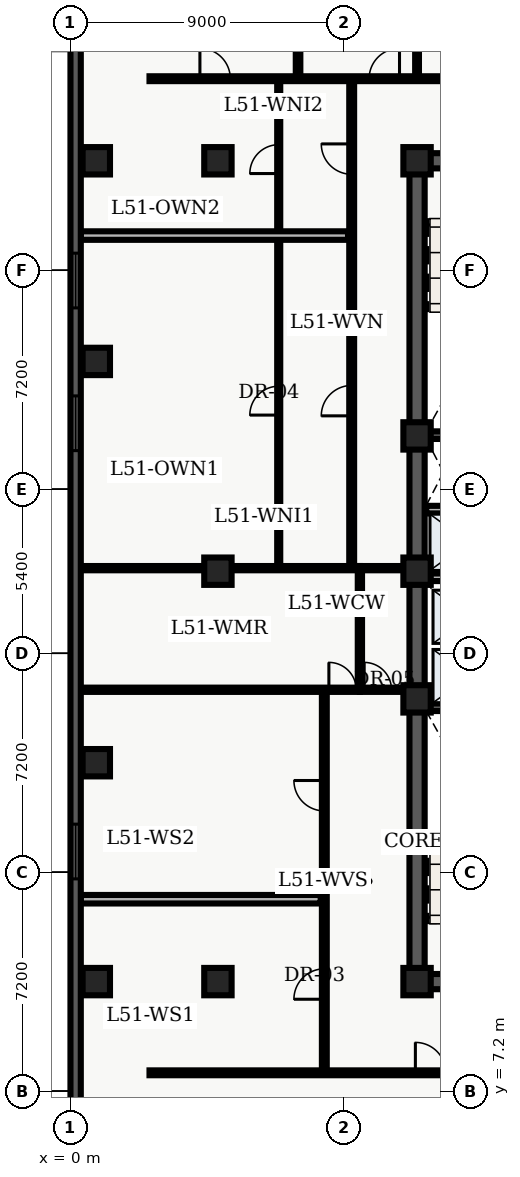
"""IFC4 building model, lengths in metres.
Left out: names, types, materials, properties, quantities, classifications, styles, units other than length and angle.
Written with IfcOpenShell. Run it as: python <this file> out.ifc"""

import sys

from ifc_helpers import new_model, entity, si_unit, converted_unit, direction, frame, origin_with_axes, origin_2d_with_axis, place, context, subcontext, project, spatial, polyline, rectangle, outline, extrude, element, fill, save


model = new_model("IFC4")
c1 = context("Model", 3, precision=1e-05, world=origin_with_axes(), true_north=direction((0.0, 1.0)))
c2 = subcontext(c1, "Body", "Model", "MODEL_VIEW")
j1 = project(units=[si_unit("LENGTHUNIT", "METRE"), converted_unit("PLANEANGLEUNIT", "DEGREE", entity("IfcPlaneAngleMeasure", 0.017), si_unit("PLANEANGLEUNIT", "RADIAN"), dimensions=[0, 0, 0, 0, 0, 0, 0])], contexts=[c1])
p1 = place(None, origin_with_axes())
s1 = spatial("IfcSite", under=j1, at=p1, CompositionType="ELEMENT")
p2 = place(p1, origin_with_axes())
s2 = spatial("IfcBuilding", under=s1, at=p2, CompositionType="ELEMENT")
p3 = place(p2, frame((0.0, 0.0, 208.2), z_axis=(0.0, 0.0, 1.0), x_axis=(1.0, 0.0, 0.0)))
s3 = spatial("IfcBuildingStorey", under=s2, at=p3, CompositionType="ELEMENT", Elevation=208.2)
p4 = place(p3, frame((11.4, 10.8, 0.0), z_axis=(0.0, 0.0, 1.0), x_axis=(0.0, 1.0, 0.0)))
e1 = element("IfcWall", 1, at=p4, inside=s3, PredefinedType="SHEAR", context=c2, shape_type="SweptSolid", body=[
    extrude(outline(polyline([(0.0, -0.25), (27.0, -0.25), (27.0, 0.25), (0.0, 0.25), (0.0, -0.25)])), origin_with_axes(), (0.0, 0.0, 1.0), 3.66),
])
p5 = place(p3, frame((11.4, 10.8, 0.0), z_axis=(0.0, 0.0, 1.0), x_axis=(1.0, 0.0, 0.0)))
e2 = element("IfcWall", 2, at=p5, inside=s3, PredefinedType="SHEAR", context=c2, shape_type="SweptSolid", body=[
    extrude(outline(polyline([(0.0, -0.25), (7.2, -0.25), (7.2, 0.25), (0.0, 0.25), (0.0, -0.25)])), origin_with_axes(), (0.0, 0.0, 1.0), 3.66),
])
p6 = place(p5, frame((2.625, 0.0, 0.0), z_axis=(0.0, 0.0, 1.0), x_axis=(1.0, 0.0, 0.0)))
e3 = element("IfcOpeningElement", 3, at=p6, cuts=e2, PredefinedType="OPENING", context=c2, shape_type="SweptSolid", body=[
    extrude(rectangle(XDim=1.05, YDim=0.52, at=origin_2d_with_axis()), origin_with_axes(), (0.0, 0.0, 1.0), 2.15),
])
p7 = place(p3, frame((11.4, 37.8, 0.0), z_axis=(0.0, 0.0, 1.0), x_axis=(1.0, 0.0, 0.0)))
e4 = element("IfcWall", 4, at=p7, inside=s3, PredefinedType="SHEAR", context=c2, shape_type="SweptSolid", body=[
    extrude(outline(polyline([(0.0, -0.25), (7.2, -0.25), (7.2, 0.25), (0.0, 0.25), (0.0, -0.25)])), origin_with_axes(), (0.0, 0.0, 1.0), 3.66),
])
p8 = place(p7, frame((2.625, 0.0, 0.0), z_axis=(0.0, 0.0, 1.0), x_axis=(1.0, 0.0, 0.0)))
e5 = element("IfcOpeningElement", 5, at=p8, cuts=e4, PredefinedType="OPENING", context=c2, shape_type="SweptSolid", body=[
    extrude(rectangle(XDim=1.05, YDim=0.52, at=origin_2d_with_axis()), origin_with_axes(), (0.0, 0.0, 1.0), 2.15),
])
for number, where, z_axis, x_axis in (
    (6, (11.65, 19.825, 0.0), (0.0, 0.0, 1.0), (1.0, 0.0, 0.0)),
    (7, (11.65, 28.775, 0.0), (0.0, 0.0, 1.0), (1.0, 0.0, 0.0)),
):
    element("IfcWall", number, at=place(p3, frame(where, z_axis=z_axis, x_axis=x_axis)), inside=s3, PredefinedType="SHEAR", context=c2, shape_type="SweptSolid", body=[
        extrude(outline(polyline([(0.0, -0.125), (6.7, -0.125), (6.7, 0.125), (0.0, 0.125), (0.0, -0.125)])), origin_with_axes(), (0.0, 0.0, 1.0), 3.66),
    ])
p9 = place(p3, frame((11.7, 24.1, 0.0), z_axis=(0.0, 0.0, 1.0), x_axis=(1.0, 0.0, 0.0)))
e8 = element("IfcWall", 8, at=p9, inside=s3, PredefinedType="SOLIDWALL", context=c2, shape_type="SweptSolid", body=[
    extrude(outline(polyline([(0.0, -0.125), (6.6, -0.125), (6.6, 0.125), (0.0, 0.125), (0.0, -0.125)])), origin_with_axes(), (0.0, 0.0, 1.0), 2.7),
])
p10 = place(p9, frame((3.6, 0.0, 0.0), z_axis=(0.0, 0.0, 1.0), x_axis=(1.0, 0.0, 0.0)))
e9 = element("IfcOpeningElement", 9, at=p10, cuts=e8, PredefinedType="OPENING", context=c2, shape_type="SweptSolid", body=[
    extrude(rectangle(XDim=0.9, YDim=0.27, at=origin_2d_with_axis()), origin_with_axes(), (0.0, 0.0, 1.0), 2.15),
])
p11 = place(p9, frame((5.65, 0.0, 0.0), z_axis=(0.0, 0.0, 1.0), x_axis=(1.0, 0.0, 0.0)))
e10 = element("IfcOpeningElement", 10, at=p11, cuts=e8, PredefinedType="OPENING", context=c2, shape_type="SweptSolid", body=[
    extrude(rectangle(XDim=0.9, YDim=0.27, at=origin_2d_with_axis()), origin_with_axes(), (0.0, 0.0, 1.0), 2.15),
])
p12 = place(p3, frame((11.7, 26.325, 0.0), z_axis=(0.0, 0.0, 1.0), x_axis=(1.0, 0.0, 0.0)))
e11 = element("IfcWall", 11, at=p12, inside=s3, PredefinedType="SOLIDWALL", context=c2, shape_type="SweptSolid", body=[
    extrude(outline(polyline([(0.0, -0.125), (6.6, -0.125), (6.6, 0.125), (0.0, 0.125), (0.0, -0.125)])), origin_with_axes(), (0.0, 0.0, 1.0), 2.7),
])
p13 = place(p12, frame((3.5, 0.0, 0.0), z_axis=(0.0, 0.0, 1.0), x_axis=(1.0, 0.0, 0.0)))
e12 = element("IfcOpeningElement", 12, at=p13, cuts=e11, PredefinedType="OPENING", context=c2, shape_type="SweptSolid", body=[
    extrude(rectangle(XDim=0.9, YDim=0.27, at=origin_2d_with_axis()), origin_with_axes(), (0.0, 0.0, 1.0), 2.15),
])
for number, where, z_axis, x_axis in (
    (13, (11.4, 10.8, 0.0), (0.0, 0.0, 1.0), (1.0, 0.0, 0.0)),
    (14, (11.4, 20.1, 0.0), (0.0, 0.0, 1.0), (1.0, 0.0, 0.0)),
    (15, (11.4, 24.3, 0.0), (0.0, 0.0, 1.0), (1.0, 0.0, 0.0)),
    (16, (11.4, 28.75, 0.0), (0.0, 0.0, 1.0), (1.0, 0.0, 0.0)),
    (17, (11.4, 37.8, 0.0), (0.0, 0.0, 1.0), (1.0, 0.0, 0.0)),
    (18, (4.85, 10.8, 0.0), (0.0, 0.0, 1.0), (1.0, 0.0, 0.0)),
    (19, (4.85, 24.3, 0.0), (0.0, 0.0, 1.0), (1.0, 0.0, 0.0)),
    (20, (4.85, 37.8, 0.0), (0.0, 0.0, 1.0), (1.0, 0.0, 0.0)),
    (21, (0.85, 10.8, 0.0), (0.0, 0.0, 1.0), (1.0, 0.0, 0.0)),
    (22, (0.85, 18.0, 0.0), (0.0, 0.0, 1.0), (1.0, 0.0, 0.0)),
    (23, (0.85, 31.2, 0.0), (0.0, 0.0, 1.0), (1.0, 0.0, 0.0)),
    (24, (0.85, 37.8, 0.0), (0.0, 0.0, 1.0), (1.0, 0.0, 0.0)),
):
    element("IfcColumn", number, at=place(p3, frame(where, z_axis=z_axis, x_axis=x_axis)), inside=s3, PredefinedType="COLUMN", context=c2, shape_type="SweptSolid", body=[
        extrude(rectangle(XDim=0.9, YDim=0.9, at=origin_2d_with_axis()), origin_with_axes(), (0.0, 0.0, 1.0), 3.9),
    ])
p14 = place(p3, frame((9.52, 20.4, 0.0), z_axis=(0.0, 0.0, 1.0), x_axis=(0.0, 1.0, 0.0)))
e25 = element("IfcWall", 25, at=p14, inside=s3, PredefinedType="PARTITIONING", context=c2, shape_type="SweptSolid", body=[
    extrude(outline(polyline([(0.0, -0.07), (4.0, -0.07), (4.0, 0.07), (0.0, 0.07), (0.0, -0.07)])), origin_with_axes(), (0.0, 0.0, 1.0), 2.7),
])
p15 = place(p3, frame((9.52, 20.4, 0.0), z_axis=(0.0, 0.0, 1.0), x_axis=(1.0, 0.0, 0.0)))
e26 = element("IfcWall", 26, at=p15, inside=s3, PredefinedType="PARTITIONING", context=c2, shape_type="SweptSolid", body=[
    extrude(outline(polyline([(0.0, -0.07), (1.58, -0.07), (1.58, 0.07), (0.0, 0.07), (0.0, -0.07)])), origin_with_axes(), (0.0, 0.0, 1.0), 2.7),
])
p16 = place(p15, frame((0.59, 0.0, 0.0), z_axis=(0.0, 0.0, 1.0), x_axis=(1.0, 0.0, 0.0)))
e27 = element("IfcOpeningElement", 27, at=p16, cuts=e26, PredefinedType="OPENING", context=c2, shape_type="SweptSolid", body=[
    extrude(rectangle(XDim=0.9, YDim=0.16, at=origin_2d_with_axis()), origin_with_axes(), (0.0, 0.0, 1.0), 2.15),
])
p17 = place(p3, frame((9.52, 24.4, 0.0), z_axis=(0.0, 0.0, 1.0), x_axis=(1.0, 0.0, 0.0)))
e28 = element("IfcWall", 28, at=p17, inside=s3, PredefinedType="PARTITIONING", context=c2, shape_type="SweptSolid", body=[
    extrude(outline(polyline([(0.0, -0.07), (1.58, -0.07), (1.58, 0.07), (0.0, 0.07), (0.0, -0.07)])), origin_with_axes(), (0.0, 0.0, 1.0), 2.7),
])
p18 = place(p3, frame((2.6, 7.8, 0.0), z_axis=(0.0, 0.0, 1.0), x_axis=(1.0, 0.0, 0.0)))
e29 = element("IfcWall", 29, at=p18, inside=s3, PredefinedType="PARTITIONING", context=c2, shape_type="SweptSolid", body=[
    extrude(outline(polyline([(0.0, -0.08), (18.55, -0.08), (18.55, 0.08), (0.0, 0.08), (0.0, -0.08)])), origin_with_axes(), (0.0, 0.0, 1.0), 2.7),
])
p19 = place(p18, frame((9.245, 0.0, 0.0), z_axis=(0.0, 0.0, 1.0), x_axis=(1.0, 0.0, 0.0)))
e30 = element("IfcOpeningElement", 30, at=p19, cuts=e29, PredefinedType="OPENING", context=c2, shape_type="SweptSolid", body=[
    extrude(rectangle(XDim=1.0, YDim=0.18, at=origin_2d_with_axis()), origin_with_axes(), (0.0, 0.0, 1.0), 2.15),
])
p20 = place(p3, frame((2.6, 40.5, 0.0), z_axis=(0.0, 0.0, 1.0), x_axis=(1.0, 0.0, 0.0)))
e31 = element("IfcWall", 31, at=p20, inside=s3, PredefinedType="PARTITIONING", context=c2, shape_type="SweptSolid", body=[
    extrude(outline(polyline([(0.0, -0.08), (27.751, -0.08), (27.751, 0.08), (0.0, 0.08), (0.0, -0.08)])), origin_with_axes(), (0.0, 0.0, 1.0), 2.7),
])
p21 = place(p20, frame((2.158, 0.0, 0.0), z_axis=(0.0, 0.0, 1.0), x_axis=(1.0, 0.0, 0.0)))
e32 = element("IfcOpeningElement", 32, at=p21, cuts=e31, PredefinedType="OPENING", context=c2, shape_type="SweptSolid", body=[
    extrude(rectangle(XDim=1.0, YDim=0.18, at=origin_2d_with_axis()), origin_with_axes(), (0.0, 0.0, 1.0), 2.15),
])
p22 = place(p20, frame((7.723, 0.0, 0.0), z_axis=(0.0, 0.0, 1.0), x_axis=(1.0, 0.0, 0.0)))
e33 = element("IfcOpeningElement", 33, at=p22, cuts=e31, PredefinedType="OPENING", context=c2, shape_type="SweptSolid", body=[
    extrude(rectangle(XDim=1.0, YDim=0.18, at=origin_2d_with_axis()), origin_with_axes(), (0.0, 0.0, 1.0), 2.15),
])
p23 = place(p20, frame((11.266, 0.0, 0.0), z_axis=(0.0, 0.0, 1.0), x_axis=(1.0, 0.0, 0.0)))
e34 = element("IfcOpeningElement", 34, at=p23, cuts=e31, PredefinedType="OPENING", context=c2, shape_type="SweptSolid", body=[
    extrude(rectangle(XDim=1.0, YDim=0.18, at=origin_2d_with_axis()), origin_with_axes(), (0.0, 0.0, 1.0), 2.15),
])
p24 = place(p20, frame((15.626, 0.0, 0.0), z_axis=(0.0, 0.0, 1.0), x_axis=(1.0, 0.0, 0.0)))
e35 = element("IfcOpeningElement", 35, at=p24, cuts=e31, PredefinedType="OPENING", context=c2, shape_type="SweptSolid", body=[
    extrude(rectangle(XDim=1.0, YDim=0.18, at=origin_2d_with_axis()), origin_with_axes(), (0.0, 0.0, 1.0), 2.15),
])
p25 = place(p3, frame((8.35, 7.8, 0.0), z_axis=(0.0, 0.0, 1.0), x_axis=(0.0, 1.0, 0.0)))
e36 = element("IfcWall", 36, at=p25, inside=s3, PredefinedType="PARTITIONING", context=c2, shape_type="SweptSolid", body=[
    extrude(outline(polyline([(0.0, -0.08), (12.6, -0.08), (12.6, 0.08), (0.0, 0.08), (0.0, -0.08)])), origin_with_axes(), (0.0, 0.0, 1.0), 2.7),
])
p26 = place(p25, frame((2.92, 0.0, 0.0), z_axis=(0.0, 0.0, 1.0), x_axis=(1.0, 0.0, 0.0)))
e37 = element("IfcOpeningElement", 37, at=p26, cuts=e36, PredefinedType="OPENING", context=c2, shape_type="SweptSolid", body=[
    extrude(rectangle(XDim=1.0, YDim=0.18, at=origin_2d_with_axis()), origin_with_axes(), (0.0, 0.0, 1.0), 2.15),
])
p27 = place(p25, frame((9.115, 0.0, 0.0), z_axis=(0.0, 0.0, 1.0), x_axis=(1.0, 0.0, 0.0)))
e38 = element("IfcOpeningElement", 38, at=p27, cuts=e36, PredefinedType="OPENING", context=c2, shape_type="SweptSolid", body=[
    extrude(rectangle(XDim=1.0, YDim=0.18, at=origin_2d_with_axis()), origin_with_axes(), (0.0, 0.0, 1.0), 2.15),
])
p28 = place(p3, frame((9.25, 24.4, 0.0), z_axis=(0.0, 0.0, 1.0), x_axis=(0.0, 1.0, 0.0)))
e39 = element("IfcWall", 39, at=p28, inside=s3, PredefinedType="PARTITIONING", context=c2, shape_type="SweptSolid", body=[
    extrude(outline(polyline([(0.0, -0.08), (16.1, -0.08), (16.1, 0.08), (0.0, 0.08), (0.0, -0.08)])), origin_with_axes(), (0.0, 0.0, 1.0), 2.7),
])
p29 = place(p28, frame((5.51, 0.0, 0.0), z_axis=(0.0, 0.0, 1.0), x_axis=(1.0, 0.0, 0.0)))
e40 = element("IfcOpeningElement", 40, at=p29, cuts=e39, PredefinedType="OPENING", context=c2, shape_type="SweptSolid", body=[
    extrude(rectangle(XDim=1.0, YDim=0.18, at=origin_2d_with_axis()), origin_with_axes(), (0.0, 0.0, 1.0), 2.15),
])
p30 = place(p28, frame((13.455, 0.0, 0.0), z_axis=(0.0, 0.0, 1.0), x_axis=(1.0, 0.0, 0.0)))
e41 = element("IfcOpeningElement", 41, at=p30, cuts=e39, PredefinedType="OPENING", context=c2, shape_type="SweptSolid", body=[
    extrude(rectangle(XDim=1.0, YDim=0.18, at=origin_2d_with_axis()), origin_with_axes(), (0.0, 0.0, 1.0), 2.15),
])
p31 = place(p3, frame((0.335, 20.4, 0.0), z_axis=(0.0, 0.0, 1.0), x_axis=(1.0, 0.0, 0.0)))
e42 = element("IfcWall", 42, at=p31, inside=s3, PredefinedType="PARTITIONING", context=c2, shape_type="SweptSolid", body=[
    extrude(outline(polyline([(0.0, -0.07), (9.185, -0.07), (9.185, 0.07), (0.0, 0.07), (0.0, -0.07)])), origin_with_axes(), (0.0, 0.0, 1.0), 2.7),
])
p32 = place(p31, frame((8.615, 0.0, 0.0), z_axis=(0.0, 0.0, 1.0), x_axis=(1.0, 0.0, 0.0)))
e43 = element("IfcOpeningElement", 43, at=p32, cuts=e42, PredefinedType="OPENING", context=c2, shape_type="SweptSolid", body=[
    extrude(rectangle(XDim=0.9, YDim=0.16, at=origin_2d_with_axis()), origin_with_axes(), (0.0, 0.0, 1.0), 2.15),
])
p33 = place(p3, frame((0.335, 24.4, 0.0), z_axis=(0.0, 0.0, 1.0), x_axis=(1.0, 0.0, 0.0)))
e44 = element("IfcWall", 44, at=p33, inside=s3, PredefinedType="PARTITIONING", context=c2, shape_type="SweptSolid", body=[
    extrude(outline(polyline([(0.0, -0.07), (9.185, -0.07), (9.185, 0.07), (0.0, 0.07), (0.0, -0.07)])), origin_with_axes(), (0.0, 0.0, 1.0), 2.7),
])
p34 = place(p3, frame((0.335, 13.51, 0.0), z_axis=(0.0, 0.0, 1.0), x_axis=(1.0, 0.0, 0.0)))
e45 = element("IfcWall", 45, at=p34, inside=s3, PredefinedType="PARTITIONING", context=c2, shape_type="SweptSolid", body=[
    extrude(outline(polyline([(0.0, -0.14), (7.895, -0.14), (7.895, 0.14), (0.0, 0.14), (0.0, -0.14)])), origin_with_axes(), (0.0, 0.0, 1.0), 2.7),
])
p35 = place(p3, frame((6.85, 24.55, 0.0), z_axis=(0.0, 0.0, 1.0), x_axis=(0.0, 1.0, 0.0)))
e46 = element("IfcWall", 46, at=p35, inside=s3, PredefinedType="PARTITIONING", context=c2, shape_type="SweptSolid", body=[
    extrude(outline(polyline([(0.0, -0.05), (15.75, -0.05), (15.75, 0.05), (0.0, 0.05), (0.0, -0.05)])), origin_with_axes(), (0.0, 0.0, 1.0), 2.7),
])
p36 = place(p35, frame((5.36, 0.0, 0.0), z_axis=(0.0, 0.0, 1.0), x_axis=(1.0, 0.0, 0.0)))
e47 = element("IfcOpeningElement", 47, at=p36, cuts=e46, PredefinedType="OPENING", context=c2, shape_type="SweptSolid", body=[
    extrude(rectangle(XDim=0.95, YDim=0.12, at=origin_2d_with_axis()), origin_with_axes(), (0.0, 0.0, 1.0), 2.15),
])
p37 = place(p35, frame((13.305, 0.0, 0.0), z_axis=(0.0, 0.0, 1.0), x_axis=(1.0, 0.0, 0.0)))
e48 = element("IfcOpeningElement", 48, at=p37, cuts=e46, PredefinedType="OPENING", context=c2, shape_type="SweptSolid", body=[
    extrude(rectangle(XDim=0.95, YDim=0.12, at=origin_2d_with_axis()), origin_with_axes(), (0.0, 0.0, 1.0), 2.15),
])
p38 = place(p3, frame((0.335, 35.34, 0.0), z_axis=(0.0, 0.0, 1.0), x_axis=(1.0, 0.0, 0.0)))
e49 = element("IfcWall", 49, at=p38, inside=s3, PredefinedType="PARTITIONING", context=c2, shape_type="SweptSolid", body=[
    extrude(outline(polyline([(0.0, -0.14), (8.795, -0.14), (8.795, 0.14), (0.0, 0.14), (0.0, -0.14)])), origin_with_axes(), (0.0, 0.0, 1.0), 2.7),
])
p39 = place(p3, frame((7.486, 40.6, 0.0), z_axis=(0.0, 0.0, 1.0), x_axis=(0.0, 1.0, 0.0)))
e50 = element("IfcWall", 50, at=p39, inside=s3, PredefinedType="PARTITIONING", context=c2, shape_type="SweptSolid", body=[
    extrude(outline(polyline([(0.0, -0.075), (7.665, -0.075), (7.665, 0.075), (0.0, 0.075), (0.0, -0.075)])), origin_with_axes(), (0.0, 0.0, 1.0), 2.7),
])
p40 = place(p3, frame((11.4, 40.6, 0.0), z_axis=(0.0, 0.0, 1.0), x_axis=(0.0, 1.0, 0.0)))
e51 = element("IfcWall", 51, at=p40, inside=s3, PredefinedType="PARTITIONING", context=c2, shape_type="SweptSolid", body=[
    extrude(outline(polyline([(0.0, -0.062), (7.665, -0.062), (7.665, 0.062), (0.0, 0.062), (0.0, -0.062)])), origin_with_axes(), (0.0, 0.0, 1.0), 2.7),
])
p41 = place(p3, frame((0.17, 2.74, 0.0), z_axis=(0.0, 0.0, 1.0), x_axis=(0.0, 1.0, 0.0)))
e52 = element("IfcWall", 52, at=p41, inside=s3, PredefinedType="SOLIDWALL", context=c2, shape_type="SweptSolid", body=[
    extrude(outline(polyline([(0.0, -0.17), (43.46, -0.17), (43.46, 0.17), (0.0, 0.17), (0.0, -0.17)])), origin_with_axes(), (0.0, 0.0, 1.0), 3.66),
])
p42 = place(p41, frame((2.948, 0.0, 0.45), z_axis=(0.0, 0.0, 1.0), x_axis=(1.0, 0.0, 0.0)))
e53 = element("IfcOpeningElement", 53, at=p42, cuts=e52, PredefinedType="OPENING", context=c2, shape_type="SweptSolid", body=[
    extrude(rectangle(XDim=1.8, YDim=0.36, at=origin_2d_with_axis()), origin_with_axes(), (0.0, 0.0, 1.0), 2.1),
])
p43 = place(p41, frame((12.339, 0.0, 0.45), z_axis=(0.0, 0.0, 1.0), x_axis=(1.0, 0.0, 0.0)))
e54 = element("IfcOpeningElement", 54, at=p43, cuts=e52, PredefinedType="OPENING", context=c2, shape_type="SweptSolid", body=[
    extrude(rectangle(XDim=1.8, YDim=0.36, at=origin_2d_with_axis()), origin_with_axes(), (0.0, 0.0, 1.0), 2.1),
])
p44 = place(p41, frame((26.426, 0.0, 0.45), z_axis=(0.0, 0.0, 1.0), x_axis=(1.0, 0.0, 0.0)))
e55 = element("IfcOpeningElement", 55, at=p44, cuts=e52, PredefinedType="OPENING", context=c2, shape_type="SweptSolid", body=[
    extrude(rectangle(XDim=1.8, YDim=0.36, at=origin_2d_with_axis()), origin_with_axes(), (0.0, 0.0, 1.0), 2.1),
])
p45 = place(p41, frame((31.121, 0.0, 0.45), z_axis=(0.0, 0.0, 1.0), x_axis=(1.0, 0.0, 0.0)))
e56 = element("IfcOpeningElement", 56, at=p45, cuts=e52, PredefinedType="OPENING", context=c2, shape_type="SweptSolid", body=[
    extrude(rectangle(XDim=1.8, YDim=0.36, at=origin_2d_with_axis()), origin_with_axes(), (0.0, 0.0, 1.0), 2.1),
])
p46 = place(p41, frame((40.062, 0.0, 0.45), z_axis=(0.0, 0.0, 1.0), x_axis=(1.0, 0.0, 0.0)))
e57 = element("IfcOpeningElement", 57, at=p46, cuts=e52, PredefinedType="OPENING", context=c2, shape_type="SweptSolid", body=[
    extrude(rectangle(XDim=1.8, YDim=0.36, at=origin_2d_with_axis()), origin_with_axes(), (0.0, 0.0, 1.0), 2.1),
])
p47 = place(p15, frame((0.59, 0.0, 0.0), z_axis=(0.0, 0.0, 1.0), x_axis=(1.0, 0.0, 0.0)))
e58 = element("IfcDoor", 58, at=p47, inside=s3, OperationType="SINGLE_SWING_LEFT", PredefinedType="DOOR", context=c2, shape_type="SweptSolid", body=[
    extrude(rectangle(XDim=0.9, YDim=0.084, at=origin_2d_with_axis()), origin_with_axes(), (0.0, 0.0, 1.0), 2.15),
])
fill(e27, e58)
p48 = place(p31, frame((8.615, 0.0, 0.0), z_axis=(0.0, 0.0, 1.0), x_axis=(1.0, 0.0, 0.0)))
e59 = element("IfcDoor", 59, at=p48, inside=s3, OperationType="SINGLE_SWING_LEFT", PredefinedType="DOOR", context=c2, shape_type="SweptSolid", body=[
    extrude(rectangle(XDim=0.9, YDim=0.084, at=origin_2d_with_axis()), origin_with_axes(), (0.0, 0.0, 1.0), 2.15),
])
fill(e43, e59)
p49 = place(p25, frame((2.92, 0.0, 0.0), z_axis=(0.0, 0.0, 1.0), x_axis=(1.0, 0.0, 0.0)))
e60 = element("IfcDoor", 60, at=p49, inside=s3, OperationType="SINGLE_SWING_LEFT", PredefinedType="DOOR", context=c2, shape_type="SweptSolid", body=[
    extrude(rectangle(XDim=1.0, YDim=0.09, at=origin_2d_with_axis()), origin_with_axes(), (0.0, 0.0, 1.0), 2.15),
])
fill(e37, e60)
p50 = place(p25, frame((9.115, 0.0, 0.0), z_axis=(0.0, 0.0, 1.0), x_axis=(1.0, 0.0, 0.0)))
e61 = element("IfcDoor", 61, at=p50, inside=s3, OperationType="SINGLE_SWING_RIGHT", PredefinedType="DOOR", context=c2, shape_type="SweptSolid", body=[
    extrude(rectangle(XDim=1.0, YDim=0.09, at=origin_2d_with_axis()), origin_with_axes(), (0.0, 0.0, 1.0), 2.15),
])
fill(e38, e61)
p51 = place(p35, frame((5.36, 0.0, 0.0), z_axis=(0.0, 0.0, 1.0), x_axis=(1.0, 0.0, 0.0)))
e62 = element("IfcDoor", 62, at=p51, inside=s3, OperationType="SINGLE_SWING_LEFT", PredefinedType="DOOR", context=c2, shape_type="SweptSolid", body=[
    extrude(rectangle(XDim=0.95, YDim=0.06, at=origin_2d_with_axis()), origin_with_axes(), (0.0, 0.0, 1.0), 2.15),
])
fill(e47, e62)
p52 = place(p28, frame((5.51, 0.0, 0.0), z_axis=(0.0, 0.0, 1.0), x_axis=(1.0, 0.0, 0.0)))
e63 = element("IfcDoor", 63, at=p52, inside=s3, OperationType="SINGLE_SWING_LEFT", PredefinedType="DOOR", context=c2, shape_type="SweptSolid", body=[
    extrude(rectangle(XDim=1.0, YDim=0.09, at=origin_2d_with_axis()), origin_with_axes(), (0.0, 0.0, 1.0), 2.15),
])
fill(e40, e63)
p53 = place(p35, frame((13.305, 0.0, 0.0), z_axis=(0.0, 0.0, 1.0), x_axis=(1.0, 0.0, 0.0)))
e64 = element("IfcDoor", 64, at=p53, inside=s3, OperationType="SINGLE_SWING_LEFT", PredefinedType="DOOR", context=c2, shape_type="SweptSolid", body=[
    extrude(rectangle(XDim=0.95, YDim=0.06, at=origin_2d_with_axis()), origin_with_axes(), (0.0, 0.0, 1.0), 2.15),
])
fill(e48, e64)
p54 = place(p28, frame((13.455, 0.0, 0.0), z_axis=(0.0, 0.0, 1.0), x_axis=(1.0, 0.0, 0.0)))
e65 = element("IfcDoor", 65, at=p54, inside=s3, OperationType="SINGLE_SWING_RIGHT", PredefinedType="DOOR", context=c2, shape_type="SweptSolid", body=[
    extrude(rectangle(XDim=1.0, YDim=0.09, at=origin_2d_with_axis()), origin_with_axes(), (0.0, 0.0, 1.0), 2.15),
])
fill(e41, e65)
p55 = place(p18, frame((9.245, 0.0, 0.0), z_axis=(0.0, 0.0, 1.0), x_axis=(1.0, 0.0, 0.0)))
e66 = element("IfcDoor", 66, at=p55, inside=s3, OperationType="SINGLE_SWING_LEFT", PredefinedType="DOOR", context=c2, shape_type="SweptSolid", body=[
    extrude(rectangle(XDim=1.0, YDim=0.09, at=origin_2d_with_axis()), origin_with_axes(), (0.0, 0.0, 1.0), 2.15),
])
fill(e30, e66)
p56 = place(p20, frame((2.158, 0.0, 0.0), z_axis=(0.0, 0.0, 1.0), x_axis=(1.0, 0.0, 0.0)))
e67 = element("IfcDoor", 67, at=p56, inside=s3, OperationType="SINGLE_SWING_LEFT", PredefinedType="DOOR", context=c2, shape_type="SweptSolid", body=[
    extrude(rectangle(XDim=1.0, YDim=0.09, at=origin_2d_with_axis()), origin_with_axes(), (0.0, 0.0, 1.0), 2.15),
])
fill(e32, e67)
p57 = place(p20, frame((7.723, 0.0, 0.0), z_axis=(0.0, 0.0, 1.0), x_axis=(1.0, 0.0, 0.0)))
e68 = element("IfcDoor", 68, at=p57, inside=s3, OperationType="SINGLE_SWING_RIGHT", PredefinedType="DOOR", context=c2, shape_type="SweptSolid", body=[
    extrude(rectangle(XDim=1.0, YDim=0.09, at=origin_2d_with_axis()), origin_with_axes(), (0.0, 0.0, 1.0), 2.15),
])
fill(e33, e68)
p58 = place(p41, frame((12.339, 0.0, 0.45), z_axis=(0.0, 0.0, 1.0), x_axis=(1.0, 0.0, 0.0)))
e69 = element("IfcWindow", 69, at=p58, inside=s3, PredefinedType="WINDOW", context=c2, shape_type="SweptSolid", body=[
    extrude(rectangle(XDim=1.8, YDim=0.09, at=origin_2d_with_axis()), origin_with_axes(), (0.0, 0.0, 1.0), 2.1),
])
fill(e54, e69)
p59 = place(p41, frame((26.426, 0.0, 0.45), z_axis=(0.0, 0.0, 1.0), x_axis=(1.0, 0.0, 0.0)))
e70 = element("IfcWindow", 70, at=p59, inside=s3, PredefinedType="WINDOW", context=c2, shape_type="SweptSolid", body=[
    extrude(rectangle(XDim=1.8, YDim=0.09, at=origin_2d_with_axis()), origin_with_axes(), (0.0, 0.0, 1.0), 2.1),
])
fill(e55, e70)
p60 = place(p41, frame((31.121, 0.0, 0.45), z_axis=(0.0, 0.0, 1.0), x_axis=(1.0, 0.0, 0.0)))
e71 = element("IfcWindow", 71, at=p60, inside=s3, PredefinedType="WINDOW", context=c2, shape_type="SweptSolid", body=[
    extrude(rectangle(XDim=1.8, YDim=0.09, at=origin_2d_with_axis()), origin_with_axes(), (0.0, 0.0, 1.0), 2.1),
])
fill(e56, e71)
save(model, sys.argv[1])
